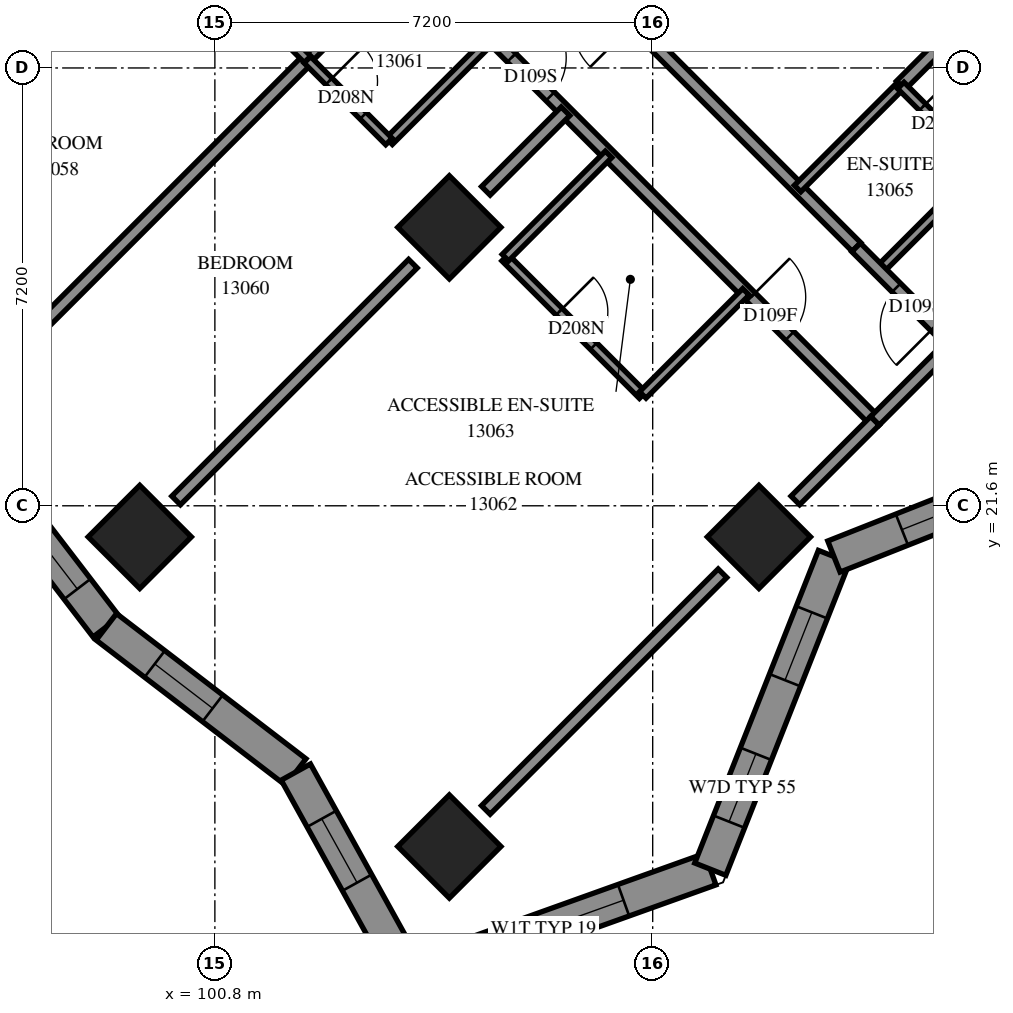
"""IFC4 building model, lengths in metres.
Left out: names, types, materials, properties, quantities, classifications, styles, units other than length and angle.
Written with IfcOpenShell. Run it as: python <this file> out.ifc"""

import sys

from ifc_helpers import new_model, si_unit, direction, frame, frame_2d, origin, origin_2d, place, context, subcontext, project, spatial, polyline, rectangle, outline, extrude, element, fill, save


model = new_model("IFC4")
c1 = context("Model", 3, precision=1e-05, world=origin(), true_north=direction((0.0, 1.0)))
c2 = subcontext(c1, "Body", "Model", "MODEL_VIEW")
j1 = project(units=[si_unit("LENGTHUNIT", "METRE"), si_unit("PLANEANGLEUNIT", "RADIAN")], contexts=[c1])
p1 = place(None, origin())
s1 = spatial("IfcSite", under=j1, at=p1, CompositionType="ELEMENT")
p2 = place(p1, origin())
s2 = spatial("IfcBuilding", under=s1, at=p2, CompositionType="ELEMENT")
p3 = place(p2, frame((0.0, 0.0, 50.8)))
s3 = spatial("IfcBuildingStorey", under=s2, at=p3, CompositionType="ELEMENT", Elevation=50.8)
for number, where, z_axis, x_axis in (
    (1, (104.656, 26.18, 0.0), (0.0, 0.0, 1.0), (0.707, -0.707, 0.0)),
    (2, (99.565, 21.088, 0.0), (0.0, 0.0, 1.0), (0.707, -0.707, 0.0)),
    (3, (109.747, 21.088, 0.0), (0.0, 0.0, 1.0), (0.707, -0.707, 0.0)),
    (4, (104.656, 15.997, 0.0), (0.0, 0.0, 1.0), (0.707, -0.707, 0.0)),
):
    element("IfcColumn", number, at=place(p3, frame(where, z_axis=z_axis, x_axis=x_axis)), inside=s3, PredefinedType="COLUMN", context=c2, shape_type="SweptSolid", body=[
        extrude(rectangle(XDim=1.2, YDim=1.2, at=origin_2d()), origin(), (0.0, 0.0, 1.0), 3.1),
    ])
p4 = place(p3, frame((103.997, 13.851, 0.0), z_axis=(0.0, 0.0, 1.0), x_axis=(0.9414545873, 0.3371398227, 0.0)))
e5 = element("IfcWall", 5, at=p4, inside=s3, PredefinedType="SOLIDWALL", context=c2, shape_type="SweptSolid", body=[
    extrude(outline(polyline([(-0.234, -0.275), (5.383, -0.275), (5.134, 0.275), (0.234, 0.275), (-0.234, -0.275)])), origin(), (0.0, 0.0, 1.0), 3.1),
])
p5 = place(p4, frame((0.943, 0.0, 0.5)))
e6 = element("IfcOpeningElement", 6, at=p5, cuts=e5, PredefinedType="OPENING", context=c2, shape_type="SweptSolid", body=[
    extrude(rectangle(XDim=2.8, YDim=2.45, at=frame_2d((1.4, 1.225))), frame((0.0, 0.285, 0.0), z_axis=(0.0, -1.0, 0.0), x_axis=(1.0, 0.0, 0.0)), (0.0, 0.0, 1.0), 0.57),
])
p6 = place(p3, frame((108.947, 15.624, 0.0), z_axis=(0.0, 0.0, 1.0), x_axis=(0.3677360094, 0.9299302272, 0.0)))
e7 = element("IfcWall", 7, at=p6, inside=s3, PredefinedType="SOLIDWALL", context=c2, shape_type="SweptSolid", body=[
    extrude(outline(polyline([(-0.124, -0.275), (5.41, -0.275), (5.648, 0.275), (0.124, 0.275), (-0.124, -0.275)])), origin(), (0.0, 0.0, 1.0), 3.1),
])
p7 = place(p6, frame((0.84, 0.0, 0.5)))
e8 = element("IfcOpeningElement", 8, at=p7, cuts=e7, PredefinedType="OPENING", context=c2, shape_type="SweptSolid", body=[
    extrude(rectangle(XDim=1.2, YDim=2.45, at=frame_2d((0.6, 1.225))), frame((0.0, 0.285, 0.0), z_axis=(0.0, -1.0, 0.0), x_axis=(1.0, 0.0, 0.0)), (0.0, 0.0, 1.0), 0.57),
])
p8 = place(p6, frame((3.342, 0.0, 0.5)))
e9 = element("IfcOpeningElement", 9, at=p8, cuts=e7, PredefinedType="OPENING", context=c2, shape_type="SweptSolid", body=[
    extrude(rectangle(XDim=1.2, YDim=2.45, at=frame_2d((0.6, 1.225))), frame((0.0, 0.285, 0.0), z_axis=(0.0, -1.0, 0.0), x_axis=(1.0, 0.0, 0.0)), (0.0, 0.0, 1.0), 0.57),
])
p9 = place(p3, frame((110.98, 20.766, 0.0), z_axis=(0.0, 0.0, 1.0), x_axis=(0.9299302272, 0.3677360094, 0.0)))
e10 = element("IfcWall", 10, at=p9, inside=s3, PredefinedType="SOLIDWALL", context=c2, shape_type="SweptSolid", body=[
    extrude(outline(polyline([(0.119, -0.275), (5.653, -0.275), (5.404, 0.275), (-0.119, 0.275), (0.119, -0.275)])), origin(), (0.0, 0.0, 1.0), 3.1),
])
p10 = place(p9, frame((1.202, 0.0, 0.5)))
e11 = element("IfcOpeningElement", 11, at=p10, cuts=e10, PredefinedType="OPENING", context=c2, shape_type="SweptSolid", body=[
    extrude(rectangle(XDim=2.8, YDim=2.45, at=frame_2d((1.4, 1.225))), frame((0.0, 0.285, 0.0), z_axis=(0.0, -1.0, 0.0), x_axis=(1.0, 0.0, 0.0)), (0.0, 0.0, 1.0), 0.57),
])
p11 = place(p3, frame((96.64, 22.709, 0.0), z_axis=(0.0, 0.0, 1.0), x_axis=(0.6083014327, -0.7937060961, 0.0)))
e12 = element("IfcWall", 12, at=p11, inside=s3, PredefinedType="SOLIDWALL", context=c2, shape_type="SweptSolid", body=[
    extrude(outline(polyline([(0.036, -0.275), (3.941, -0.275), (3.869, 0.275), (-0.036, 0.275), (0.036, -0.275)])), origin(), (0.0, 0.0, 1.0), 3.1),
])
p12 = place(p11, frame((0.321, 0.0, 0.5)))
e13 = element("IfcOpeningElement", 13, at=p12, cuts=e12, PredefinedType="OPENING", context=c2, shape_type="SweptSolid", body=[
    extrude(rectangle(XDim=2.8, YDim=2.45, at=frame_2d((1.4, 1.225))), frame((0.0, 0.285, 0.0), z_axis=(0.0, -1.0, 0.0), x_axis=(1.0, 0.0, 0.0)), (0.0, 0.0, 1.0), 0.57),
])
p13 = place(p3, frame((99.015, 19.609, 0.0), z_axis=(0.0, 0.0, 1.0), x_axis=(0.7937059715, -0.6083015953, 0.0)))
e14 = element("IfcWall", 14, at=p13, inside=s3, PredefinedType="SOLIDWALL", context=c2, shape_type="SweptSolid", body=[
    extrude(outline(polyline([(-0.036, -0.275), (3.869, -0.275), (3.983, 0.275), (0.036, 0.275), (-0.036, -0.275)])), origin(), (0.0, 0.0, 1.0), 3.1),
])
p14 = place(p13, frame((1.002, 0.0, 0.5)))
e15 = element("IfcOpeningElement", 15, at=p14, cuts=e14, PredefinedType="OPENING", context=c2, shape_type="SweptSolid", body=[
    extrude(rectangle(XDim=1.2, YDim=2.45, at=frame_2d((0.6, 1.225))), frame((0.0, 0.285, 0.0), z_axis=(0.0, -1.0, 0.0), x_axis=(1.0, 0.0, 0.0)), (0.0, 0.0, 1.0), 0.57),
])
p15 = place(p3, frame((102.131, 17.221, 0.0), z_axis=(0.0, 0.0, 1.0), x_axis=(0.4843946683, -0.8748495901, 0.0)))
e16 = element("IfcWall", 16, at=p15, inside=s3, PredefinedType="SOLIDWALL", context=c2, shape_type="SweptSolid", body=[
    extrude(outline(polyline([(0.057, -0.275), (4.085, -0.275), (3.618, 0.275), (-0.057, 0.275), (0.057, -0.275)])), origin(), (0.0, 0.0, 1.0), 3.1),
])
p16 = place(p15, frame((0.879, 0.0, 0.5)))
e17 = element("IfcOpeningElement", 17, at=p16, cuts=e16, PredefinedType="OPENING", context=c2, shape_type="SweptSolid", body=[
    extrude(rectangle(XDim=1.2, YDim=2.45, at=frame_2d((0.6, 1.225))), frame((0.0, 0.285, 0.0), z_axis=(0.0, -1.0, 0.0), x_axis=(1.0, 0.0, 0.0)), (0.0, 0.0, 1.0), 0.57),
])
p17 = place(p3, frame((93.481, 41.167, 0.0), z_axis=(0.0, 0.0, 1.0), x_axis=(0.7071067812, -0.7071067812, 0.0)))
e18 = element("IfcWall", 18, at=p17, inside=s3, PredefinedType="PARTITIONING", context=c2, shape_type="SweptSolid", body=[
    extrude(rectangle(XDim=25.699, YDim=0.2, at=frame_2d((12.85, 0.0))), origin(), (0.0, 0.0, 1.0), 3.1),
])
p18 = place(p17, frame((2.8, 0.0, 0.0)))
e19 = element("IfcOpeningElement", 19, at=p18, cuts=e18, PredefinedType="OPENING", context=c2, shape_type="SweptSolid", body=[
    extrude(rectangle(XDim=0.9, YDim=2.1, at=frame_2d((0.45, 1.05))), frame((0.0, 0.11, 0.0), z_axis=(0.0, -1.0, 0.0), x_axis=(1.0, 0.0, 0.0)), (0.0, 0.0, 1.0), 0.22),
])
p19 = place(p17, frame((9.948, 0.0, 0.0)))
e20 = element("IfcOpeningElement", 20, at=p19, cuts=e18, PredefinedType="OPENING", context=c2, shape_type="SweptSolid", body=[
    extrude(rectangle(XDim=0.9, YDim=2.1, at=frame_2d((0.45, 1.05))), frame((0.0, 0.11, 0.0), z_axis=(0.0, -1.0, 0.0), x_axis=(1.0, 0.0, 0.0)), (0.0, 0.0, 1.0), 0.22),
])
p20 = place(p17, frame((11.7, 0.0, 0.0)))
e21 = element("IfcOpeningElement", 21, at=p20, cuts=e18, PredefinedType="OPENING", context=c2, shape_type="SweptSolid", body=[
    extrude(rectangle(XDim=0.9, YDim=2.1, at=frame_2d((0.45, 1.05))), frame((0.0, 0.11, 0.0), z_axis=(0.0, -1.0, 0.0), x_axis=(1.0, 0.0, 0.0)), (0.0, 0.0, 1.0), 0.22),
])
p21 = place(p17, frame((17.25, 0.0, 0.0)))
e22 = element("IfcOpeningElement", 22, at=p21, cuts=e18, PredefinedType="OPENING", context=c2, shape_type="SweptSolid", body=[
    extrude(rectangle(XDim=0.9, YDim=2.1, at=frame_2d((0.45, 1.05))), frame((0.0, 0.11, 0.0), z_axis=(0.0, -1.0, 0.0), x_axis=(1.0, 0.0, 0.0)), (0.0, 0.0, 1.0), 0.22),
])
p22 = place(p17, frame((22.82, 0.0, 0.0)))
e23 = element("IfcOpeningElement", 23, at=p22, cuts=e18, PredefinedType="OPENING", context=c2, shape_type="SweptSolid", body=[
    extrude(rectangle(XDim=0.9, YDim=2.1, at=frame_2d((0.45, 1.05))), frame((0.0, 0.11, 0.0), z_axis=(0.0, -1.0, 0.0), x_axis=(1.0, 0.0, 0.0)), (0.0, 0.0, 1.0), 0.22),
])
p23 = place(p3, frame((111.352, 25.855, 0.0), z_axis=(0.0, 0.0, 1.0), x_axis=(-0.7070418597, 0.7071716967, 0.0)))
e24 = element("IfcWall", 24, at=p23, inside=s3, PredefinedType="PARTITIONING", context=c2, shape_type="SweptSolid", body=[
    extrude(rectangle(XDim=13.864, YDim=0.2, at=frame_2d((6.932, 0.0))), origin(), (0.0, 0.0, 1.0), 3.1),
])
p24 = place(p23, frame((12.564, 0.0, 0.0)))
e25 = element("IfcOpeningElement", 25, at=p24, cuts=e24, PredefinedType="OPENING", context=c2, shape_type="SweptSolid", body=[
    extrude(rectangle(XDim=0.9, YDim=2.1, at=frame_2d((0.45, 1.05))), frame((0.0, 0.11, 0.0), z_axis=(0.0, -1.0, 0.0), x_axis=(1.0, 0.0, 0.0)), (0.0, 0.0, 1.0), 0.22),
])
p25 = place(p23, frame((5.19, 0.0, 0.0)))
e26 = element("IfcOpeningElement", 26, at=p25, cuts=e24, PredefinedType="OPENING", context=c2, shape_type="SweptSolid", body=[
    extrude(rectangle(XDim=1.0, YDim=2.1, at=frame_2d((0.5, 1.05))), frame((0.0, 0.11, 0.0), z_axis=(0.0, -1.0, 0.0), x_axis=(1.0, 0.0, 0.0)), (0.0, 0.0, 1.0), 0.22),
])
p26 = place(p3, frame((96.526, 23.142, 0.0), z_axis=(0.0, 0.0, 1.0), x_axis=(0.7071128801, 0.7071006822, 0.0)))
e27 = element("IfcWall", 27, at=p26, inside=s3, PredefinedType="PARTITIONING", context=c2, shape_type="SweptSolid", body=[
    extrude(rectangle(XDim=8.198, YDim=0.2, at=frame_2d((4.099, 0.0))), origin(), (0.0, 0.0, 1.0), 3.1),
])
p27 = place(p3, frame((100.162, 21.688, 0.0), z_axis=(0.0, 0.0, 1.0), x_axis=(0.7071067812, 0.7071067812, 0.0)))
e28 = element("IfcWall", 28, at=p27, inside=s3, PredefinedType="PARTITIONING", context=c2, shape_type="SweptSolid", body=[
    extrude(rectangle(XDim=5.507, YDim=0.2, at=frame_2d((2.753, 0.0))), origin(), (0.0, 0.0, 1.0), 3.1),
])
p28 = place(p3, frame((105.255, 16.599, 0.0), z_axis=(0.0, 0.0, 1.0), x_axis=(0.7071067812, 0.7071067812, 0.0)))
e29 = element("IfcWall", 29, at=p28, inside=s3, PredefinedType="PARTITIONING", context=c2, shape_type="SweptSolid", body=[
    extrude(rectangle(XDim=5.504, YDim=0.2, at=frame_2d((2.752, 0.0))), origin(), (0.0, 0.0, 1.0), 2.6),
])
p29 = place(p3, frame((95.073, 26.781, 0.0), z_axis=(0.0, 0.0, 1.0), x_axis=(0.7071067812, 0.7071067812, 0.0)))
e30 = element("IfcWall", 30, at=p29, inside=s3, PredefinedType="PARTITIONING", context=c2, shape_type="SweptSolid", body=[
    extrude(rectangle(XDim=5.501, YDim=0.2, at=frame_2d((2.751, 0.0))), origin(), (0.0, 0.0, 1.0), 3.1),
])
p30 = place(p3, frame((112.079, 28.513, 0.0), z_axis=(0.0, 0.0, 1.0), x_axis=(0.7071067812, 0.7071067812, 0.0)))
e31 = element("IfcWall", 31, at=p30, inside=s3, PredefinedType="PARTITIONING", context=c2, shape_type="SweptSolid", body=[
    extrude(rectangle(XDim=3.351, YDim=0.2, at=frame_2d((1.675, 0.0))), origin(), (0.0, 0.0, 1.0), 3.1),
])
p31 = place(p3, frame((105.573, 25.681, 0.0), z_axis=(0.0, 0.0, 1.0), x_axis=(0.7071067812, -0.7071067812, 0.0)))
e32 = element("IfcWall", 32, at=p31, inside=s3, PredefinedType="PARTITIONING", context=c2, shape_type="SweptSolid", body=[
    extrude(rectangle(XDim=3.199, YDim=0.15, at=frame_2d((1.599, 0.0))), origin(), (0.0, 0.0, 1.0), 3.1),
])
p32 = place(p31, frame((1.258, 0.0, 0.0)))
e33 = element("IfcOpeningElement", 33, at=p32, cuts=e32, PredefinedType="OPENING", context=c2, shape_type="SweptSolid", body=[
    extrude(rectangle(XDim=0.8, YDim=2.1, at=frame_2d((0.4, 1.05))), frame((0.0, 0.085, 0.0), z_axis=(0.0, -1.0, 0.0), x_axis=(1.0, 0.0, 0.0)), (0.0, 0.0, 1.0), 0.17),
])
p33 = place(p3, frame((111.725, 25.473, 0.0), z_axis=(0.0, 0.0, 1.0), x_axis=(0.7071067812, 0.7071067812, 0.0)))
e34 = element("IfcWall", 34, at=p33, inside=s3, PredefinedType="PARTITIONING", context=c2, shape_type="SweptSolid", body=[
    extrude(rectangle(XDim=2.401, YDim=0.15, at=frame_2d((1.201, 0.0))), origin(), (0.0, 0.0, 1.0), 3.1),
])
p34 = place(p3, frame((105.578, 25.682, 0.0), z_axis=(0.0, 0.0, 1.0), x_axis=(0.706689978, 0.7075233388, 0.0)))
e35 = element("IfcWall", 35, at=p34, inside=s3, PredefinedType="PARTITIONING", context=c2, shape_type="SweptSolid", body=[
    extrude(rectangle(XDim=2.4, YDim=0.15, at=frame_2d((1.2, 0.0))), origin(), (0.0, 0.0, 1.0), 3.1),
])
for number, where, z_axis, x_axis in (
    (36, (110.383, 26.817, 0.0), (0.0, 0.0, 1.0), (0.707, 0.707, 0.0)),
    (37, (102.323, 28.939, 0.0), (0.0, 0.0, 1.0), (0.707, 0.707, 0.0)),
    (38, (103.665, 27.595, 0.0), (0.0, 0.0, 1.0), (0.707, 0.707, 0.0)),
    (39, (107.837, 23.423, 0.0), (0.0, 0.0, 1.0), (0.707, 0.707, 0.0)),
):
    element("IfcWall", number, at=place(p3, frame(where, z_axis=z_axis, x_axis=x_axis)), inside=s3, PredefinedType="PARTITIONING", context=c2, shape_type="SweptSolid", body=[
        extrude(rectangle(XDim=2.398, YDim=0.15, at=frame_2d((1.199, 0.0))), origin(), (0.0, 0.0, 1.0), 3.1),
    ])
p35 = place(p3, frame((112.925, 24.267, 0.0), z_axis=(0.0, 0.0, 1.0), x_axis=(-0.7068383786, 0.707375082, 0.0)))
e40 = element("IfcWall", 40, at=p35, inside=s3, PredefinedType="PARTITIONING", context=c2, shape_type="SweptSolid", body=[
    extrude(rectangle(XDim=2.236, YDim=0.2, at=frame_2d((1.118, 0.0))), origin(), (0.0, 0.0, 1.0), 3.1),
])
p36 = place(p35, frame((0.4, 0.0, 0.0)))
e41 = element("IfcOpeningElement", 41, at=p36, cuts=e40, PredefinedType="OPENING", context=c2, shape_type="SweptSolid", body=[
    extrude(rectangle(XDim=0.9, YDim=2.1, at=frame_2d((0.45, 1.05))), frame((0.0, 0.11, 0.0), z_axis=(0.0, -1.0, 0.0), x_axis=(1.0, 0.0, 0.0)), (0.0, 0.0, 1.0), 0.22),
])
p37 = place(p3, frame((100.981, 30.283, 0.0), z_axis=(0.0, 0.0, 1.0), x_axis=(0.7076330979, -0.7065800724, 0.0)))
e42 = element("IfcWall", 42, at=p37, inside=s3, PredefinedType="PARTITIONING", context=c2, shape_type="SweptSolid", body=[
    extrude(rectangle(XDim=1.899, YDim=0.15, at=frame_2d((0.95, 0.0))), origin(), (0.0, 0.0, 1.0), 3.1),
])
p38 = place(p37, frame((0.493, 0.0, 0.0)))
e43 = element("IfcOpeningElement", 43, at=p38, cuts=e42, PredefinedType="OPENING", context=c2, shape_type="SweptSolid", body=[
    extrude(rectangle(XDim=0.8, YDim=2.1, at=frame_2d((0.4, 1.05))), frame((0.0, 0.085, 0.0), z_axis=(0.0, -1.0, 0.0), x_axis=(1.0, 0.0, 0.0)), (0.0, 0.0, 1.0), 0.17),
])
p39 = place(p3, frame((102.321, 28.935, 0.0), z_axis=(0.0, 0.0, 1.0), x_axis=(0.7065800724, -0.7076330979, 0.0)))
e44 = element("IfcWall", 44, at=p39, inside=s3, PredefinedType="PARTITIONING", context=c2, shape_type="SweptSolid", body=[
    extrude(rectangle(XDim=1.899, YDim=0.15, at=frame_2d((0.95, 0.0))), origin(), (0.0, 0.0, 1.0), 3.1),
])
p40 = place(p39, frame((0.501, 0.0, 0.0)))
e45 = element("IfcOpeningElement", 45, at=p40, cuts=e44, PredefinedType="OPENING", context=c2, shape_type="SweptSolid", body=[
    extrude(rectangle(XDim=0.8, YDim=2.1, at=frame_2d((0.4, 1.05))), frame((0.0, 0.085, 0.0), z_axis=(0.0, -1.0, 0.0), x_axis=(1.0, 0.0, 0.0)), (0.0, 0.0, 1.0), 0.17),
])
p41 = place(p3, frame((112.08, 28.512, 0.0), z_axis=(0.0, 0.0, 1.0), x_axis=(0.7076330979, -0.7065800724, 0.0)))
e46 = element("IfcWall", 46, at=p41, inside=s3, PredefinedType="PARTITIONING", context=c2, shape_type="SweptSolid", body=[
    extrude(rectangle(XDim=1.899, YDim=0.15, at=frame_2d((0.95, 0.0))), origin(), (0.0, 0.0, 1.0), 3.1),
])
p42 = place(p41, frame((0.505, 0.0, 0.0)))
e47 = element("IfcOpeningElement", 47, at=p42, cuts=e46, PredefinedType="OPENING", context=c2, shape_type="SweptSolid", body=[
    extrude(rectangle(XDim=0.8, YDim=2.1, at=frame_2d((0.4, 1.05))), frame((0.0, 0.085, 0.0), z_axis=(0.0, -1.0, 0.0), x_axis=(1.0, 0.0, 0.0)), (0.0, 0.0, 1.0), 0.17),
])
p43 = place(p3, frame((110.346, 21.689, 0.0), z_axis=(0.0, 0.0, 1.0), x_axis=(0.7071067812, 0.7071067812, 0.0)))
e48 = element("IfcWall", 48, at=p43, inside=s3, PredefinedType="PARTITIONING", context=c2, shape_type="SweptSolid", body=[
    extrude(rectangle(XDim=1.853, YDim=0.2, at=frame_2d((0.926, 0.0))), origin(), (0.0, 0.0, 1.0), 2.6),
])
p44 = place(p3, frame((105.256, 26.78, 0.0), z_axis=(0.0, 0.0, 1.0), x_axis=(0.7076467632, 0.7065663865, 0.0)))
e49 = element("IfcWall", 49, at=p44, inside=s3, PredefinedType="PARTITIONING", context=c2, shape_type="SweptSolid", body=[
    extrude(rectangle(XDim=1.851, YDim=0.2, at=frame_2d((0.926, 0.0))), origin(), (0.0, 0.0, 1.0), 3.1),
])
p45 = place(p3, frame((111.656, 22.998, 0.0), z_axis=(0.0, 0.0, 1.0), x_axis=(0.7071067812, 0.7071067812, 0.0)))
e50 = element("IfcWall", 50, at=p45, inside=s3, PredefinedType="PARTITIONING", context=c2, shape_type="SweptSolid", body=[
    extrude(rectangle(XDim=1.799, YDim=0.2, at=frame_2d((0.899, 0.0))), origin(), (0.0, 0.0, 1.0), 2.6),
])
p46 = place(p5, origin())
e51 = element("IfcWindow", 51, at=p46, inside=s3, PartitioningType="SINGLE_PANEL", PredefinedType="WINDOW", context=c2, shape_type="SweptSolid", body=[
    extrude(rectangle(XDim=2.8, YDim=2.45, at=frame_2d((1.4, 1.225))), frame((0.0, 0.155, 0.0), z_axis=(0.0, -1.0, 0.0), x_axis=(1.0, 0.0, 0.0)), (0.0, 0.0, 1.0), 0.06),
])
fill(e6, e51)
p47 = place(p7, origin())
e52 = element("IfcWindow", 52, at=p47, inside=s3, PartitioningType="SINGLE_PANEL", PredefinedType="WINDOW", context=c2, shape_type="SweptSolid", body=[
    extrude(rectangle(XDim=1.2, YDim=2.45, at=frame_2d((0.6, 1.225))), frame((0.0, 0.155, 0.0), z_axis=(0.0, -1.0, 0.0), x_axis=(1.0, 0.0, 0.0)), (0.0, 0.0, 1.0), 0.06),
])
fill(e8, e52)
p48 = place(p8, origin())
e53 = element("IfcWindow", 53, at=p48, inside=s3, PartitioningType="SINGLE_PANEL", PredefinedType="WINDOW", context=c2, shape_type="SweptSolid", body=[
    extrude(rectangle(XDim=1.2, YDim=2.45, at=frame_2d((0.6, 1.225))), frame((0.0, 0.155, 0.0), z_axis=(0.0, -1.0, 0.0), x_axis=(1.0, 0.0, 0.0)), (0.0, 0.0, 1.0), 0.06),
])
fill(e9, e53)
p49 = place(p10, origin())
e54 = element("IfcWindow", 54, at=p49, inside=s3, PartitioningType="SINGLE_PANEL", PredefinedType="WINDOW", context=c2, shape_type="SweptSolid", body=[
    extrude(rectangle(XDim=2.8, YDim=2.45, at=frame_2d((1.4, 1.225))), frame((0.0, 0.155, 0.0), z_axis=(0.0, -1.0, 0.0), x_axis=(1.0, 0.0, 0.0)), (0.0, 0.0, 1.0), 0.06),
])
fill(e11, e54)
p50 = place(p12, origin())
e55 = element("IfcWindow", 55, at=p50, inside=s3, PartitioningType="SINGLE_PANEL", PredefinedType="WINDOW", context=c2, shape_type="SweptSolid", body=[
    extrude(rectangle(XDim=2.8, YDim=2.45, at=frame_2d((1.4, 1.225))), frame((0.0, 0.155, 0.0), z_axis=(0.0, -1.0, 0.0), x_axis=(1.0, 0.0, 0.0)), (0.0, 0.0, 1.0), 0.06),
])
fill(e13, e55)
p51 = place(p14, origin())
e56 = element("IfcWindow", 56, at=p51, inside=s3, PartitioningType="SINGLE_PANEL", PredefinedType="WINDOW", context=c2, shape_type="SweptSolid", body=[
    extrude(rectangle(XDim=1.2, YDim=2.45, at=frame_2d((0.6, 1.225))), frame((0.0, 0.155, 0.0), z_axis=(0.0, -1.0, 0.0), x_axis=(1.0, 0.0, 0.0)), (0.0, 0.0, 1.0), 0.06),
])
fill(e15, e56)
p52 = place(p16, origin())
e57 = element("IfcWindow", 57, at=p52, inside=s3, PartitioningType="SINGLE_PANEL", PredefinedType="WINDOW", context=c2, shape_type="SweptSolid", body=[
    extrude(rectangle(XDim=1.2, YDim=2.45, at=frame_2d((0.6, 1.225))), frame((0.0, 0.155, 0.0), z_axis=(0.0, -1.0, 0.0), x_axis=(1.0, 0.0, 0.0)), (0.0, 0.0, 1.0), 0.06),
])
fill(e17, e57)
p53 = place(p21, origin())
e58 = element("IfcDoor", 58, at=p53, inside=s3, OperationType="SINGLE_SWING_LEFT", PredefinedType="DOOR", context=c2, shape_type="SweptSolid", body=[
    extrude(rectangle(XDim=0.9, YDim=2.1, at=frame_2d((0.45, 1.05))), frame((0.0, 0.025, 0.0), z_axis=(0.0, -1.0, 0.0), x_axis=(1.0, 0.0, 0.0)), (0.0, 0.0, 1.0), 0.05),
])
fill(e22, e58)
p54 = place(p40, origin())
e59 = element("IfcDoor", 59, at=p54, inside=s3, OperationType="SINGLE_SWING_RIGHT", PredefinedType="DOOR", context=c2, shape_type="SweptSolid", body=[
    extrude(rectangle(XDim=0.8, YDim=2.1, at=frame_2d((0.4, 1.05))), frame((0.0, 0.025, 0.0), z_axis=(0.0, -1.0, 0.0), x_axis=(1.0, 0.0, 0.0)), (0.0, 0.0, 1.0), 0.05),
])
fill(e45, e59)
p55 = place(p22, origin())
e60 = element("IfcDoor", 60, at=p55, inside=s3, OperationType="SINGLE_SWING_RIGHT", PredefinedType="DOOR", context=c2, shape_type="SweptSolid", body=[
    extrude(rectangle(XDim=0.9, YDim=2.1, at=frame_2d((0.45, 1.05))), frame((0.0, 0.025, 0.0), z_axis=(0.0, -1.0, 0.0), x_axis=(1.0, 0.0, 0.0)), (0.0, 0.0, 1.0), 0.05),
])
fill(e23, e60)
p56 = place(p32, origin())
e61 = element("IfcDoor", 61, at=p56, inside=s3, OperationType="SINGLE_SWING_RIGHT", PredefinedType="DOOR", context=c2, shape_type="SweptSolid", body=[
    extrude(rectangle(XDim=0.8, YDim=2.1, at=frame_2d((0.4, 1.05))), frame((0.0, 0.025, 0.0), z_axis=(0.0, -1.0, 0.0), x_axis=(1.0, 0.0, 0.0)), (0.0, 0.0, 1.0), 0.05),
])
fill(e33, e61)
p57 = place(p36, origin())
e62 = element("IfcDoor", 62, at=p57, inside=s3, OperationType="SINGLE_SWING_RIGHT", PredefinedType="DOOR", context=c2, shape_type="SweptSolid", body=[
    extrude(rectangle(XDim=0.9, YDim=2.1, at=frame_2d((0.45, 1.05))), frame((0.0, 0.025, 0.0), z_axis=(0.0, -1.0, 0.0), x_axis=(1.0, 0.0, 0.0)), (0.0, 0.0, 1.0), 0.05),
])
fill(e41, e62)
p58 = place(p42, origin())
e63 = element("IfcDoor", 63, at=p58, inside=s3, OperationType="SINGLE_SWING_RIGHT", PredefinedType="DOOR", context=c2, shape_type="SweptSolid", body=[
    extrude(rectangle(XDim=0.8, YDim=2.1, at=frame_2d((0.4, 1.05))), frame((0.0, 0.025, 0.0), z_axis=(0.0, -1.0, 0.0), x_axis=(1.0, 0.0, 0.0)), (0.0, 0.0, 1.0), 0.05),
])
fill(e47, e63)
save(model, sys.argv[1])
